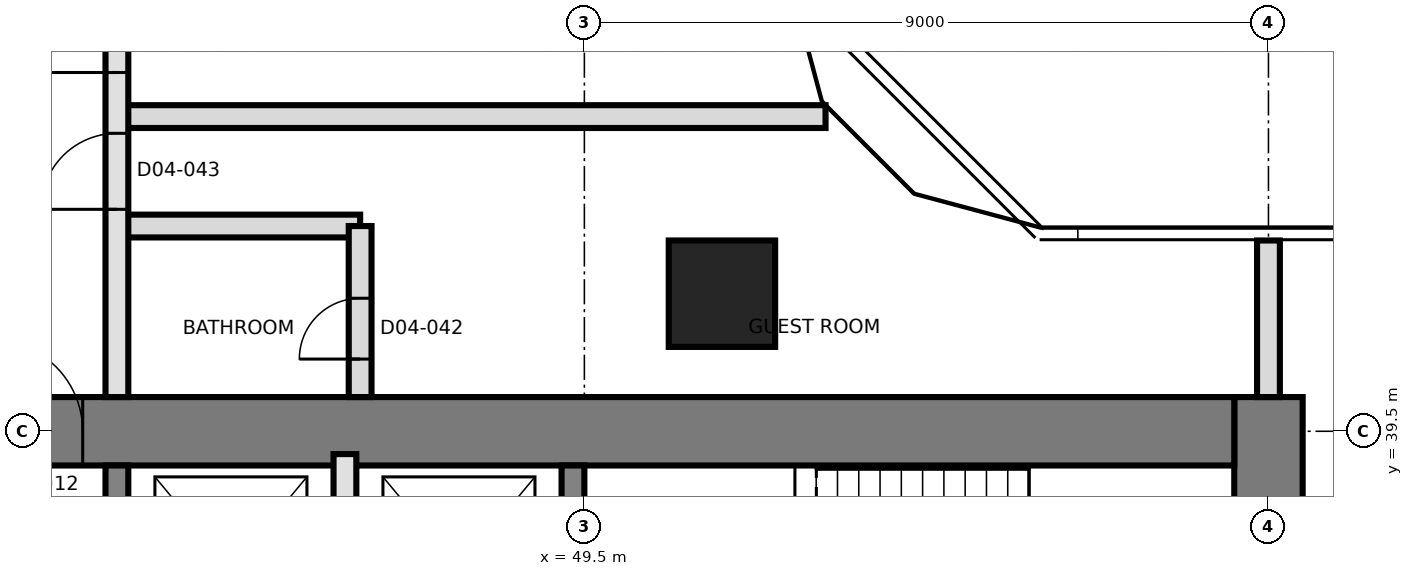
"""IFC4 building model, lengths in metres.
Left out: names, types, materials, properties, quantities, classifications, styles, units other than length and angle.
Written with IfcOpenShell. Run it as: python <this file> out.ifc"""

import sys

from ifc_helpers import new_model, si_unit, direction, frame, frame_2d, origin, origin_2d, place, context, subcontext, project, spatial, rectangle, extrude, element, fill, save


model = new_model("IFC4")
c1 = context("Model", 3, precision=1e-05, world=origin(), true_north=direction((0.0, 1.0)))
c2 = subcontext(c1, "Body", "Model", "MODEL_VIEW")
j1 = project(units=[si_unit("LENGTHUNIT", "METRE"), si_unit("PLANEANGLEUNIT", "RADIAN")], contexts=[c1])
p1 = place(None, origin())
s1 = spatial("IfcSite", under=j1, at=p1, CompositionType="ELEMENT")
p2 = place(p1, origin())
s2 = spatial("IfcBuilding", under=s1, at=p2, CompositionType="ELEMENT")
p3 = place(p2, frame((0.0, 0.0, 66.8)))
s3 = spatial("IfcBuildingStorey", under=s2, at=p3, CompositionType="ELEMENT", Elevation=66.8)
p4 = place(p3, frame((58.5, 21.05, 0.0), z_axis=(0.0, 0.0, 1.0), x_axis=(0.0, 1.0, 0.0)))
e1 = element("IfcWall", 1, at=p4, inside=s3, PredefinedType="SHEAR", context=c2, shape_type="SweptSolid", body=[
    extrude(rectangle(XDim=18.9, YDim=0.9, at=frame_2d((9.45, 0.0))), origin(), (0.0, 0.0, 1.0), 3.7),
])
p5 = place(p4, frame((10.35, 0.0, 0.0)))
e2 = element("IfcOpeningElement", 2, at=p5, cuts=e1, PredefinedType="OPENING", context=c2, shape_type="SweptSolid", body=[
    extrude(rectangle(XDim=1.2, YDim=2.1, at=frame_2d((0.6, 1.05))), frame((0.0, 0.46, 0.0), z_axis=(0.0, -1.0, 0.0), x_axis=(1.0, 0.0, 0.0)), (0.0, 0.0, 1.0), 0.92),
])
p6 = place(p3, frame((31.05, 39.5, 0.0), z_axis=(0.0, 0.0, 1.0), x_axis=(1.0, 0.0, 0.0)))
e3 = element("IfcWall", 3, at=p6, inside=s3, PredefinedType="SHEAR", context=c2, shape_type="SweptSolid", body=[
    extrude(rectangle(XDim=27.0, YDim=0.9, at=frame_2d((13.5, 0.0))), origin(), (0.0, 0.0, 1.0), 3.7),
])
p7 = place(p6, frame((10.65, 0.0, 0.0)))
e4 = element("IfcOpeningElement", 4, at=p7, cuts=e3, PredefinedType="OPENING", context=c2, shape_type="SweptSolid", body=[
    extrude(rectangle(XDim=1.2, YDim=2.1, at=frame_2d((0.6, 1.05))), frame((0.0, 0.46, 0.0), z_axis=(0.0, -1.0, 0.0), x_axis=(1.0, 0.0, 0.0)), (0.0, 0.0, 1.0), 0.92),
])
for number, where, z_axis, x_axis in (
    (5, (43.35, 33.5, 0.0), (0.0, 0.0, 1.0), (0.0, 1.0, 0.0)),
    (6, (49.35, 33.5, 0.0), (0.0, 0.0, 1.0), (0.0, 1.0, 0.0)),
):
    element("IfcWall", number, at=place(p3, frame(where, z_axis=z_axis, x_axis=x_axis)), inside=s3, PredefinedType="SHEAR", context=c2, shape_type="SweptSolid", body=[
        extrude(rectangle(XDim=5.55, YDim=0.3, at=frame_2d((2.775, 0.0))), origin(), (0.0, 0.0, 1.0), 3.7),
    ])
p8 = place(p3, frame((51.31, 41.31, 0.0), z_axis=(0.0, 0.0, 1.0), x_axis=(1.0, 0.0, 0.0)))
e7 = element("IfcColumn", 7, at=p8, inside=s3, PredefinedType="COLUMN", context=c2, shape_type="SweptSolid", body=[
    extrude(rectangle(XDim=1.4, YDim=1.4, at=origin_2d()), origin(), (0.0, 0.0, 1.0), 3.7),
])
p9 = place(p3, frame((46.35, 36.2, 0.0), z_axis=(0.0, 0.0, 1.0), x_axis=(0.0, 1.0, 0.0)))
e8 = element("IfcWall", 8, at=p9, inside=s3, PredefinedType="SOLIDWALL", context=c2, shape_type="SweptSolid", body=[
    extrude(rectangle(XDim=3.0, YDim=0.3, at=frame_2d((1.5, 0.0))), origin(), (0.0, 0.0, 1.0), 3.4),
])
p10 = place(p3, frame((43.35, 42.2, 0.0), z_axis=(0.0, 0.0, 1.0), x_axis=(1.0, 0.0, 0.0)))
e9 = element("IfcWall", 9, at=p10, inside=s3, PredefinedType="PARTITIONING", context=c2, shape_type="SweptSolid", body=[
    extrude(rectangle(XDim=3.2, YDim=0.3, at=frame_2d((1.6, 0.0))), origin(), (0.0, 0.0, 1.0), 3.4),
])
p11 = place(p3, frame((43.35, 43.64, 0.0), z_axis=(0.0, 0.0, 1.0), x_axis=(1.0, 0.0, 0.0)))
e10 = element("IfcWall", 10, at=p11, inside=s3, PredefinedType="PARTITIONING", context=c2, shape_type="SweptSolid", body=[
    extrude(rectangle(XDim=9.323, YDim=0.3, at=frame_2d((4.662, 0.0))), origin(), (0.0, 0.0, 1.0), 3.35),
])
p12 = place(p3, frame((43.35, 39.95, 0.0), z_axis=(0.0, 0.0, 1.0), x_axis=(0.0, 1.0, 0.0)))
e11 = element("IfcWall", 11, at=p12, inside=s3, PredefinedType="SOLIDWALL", context=c2, shape_type="SweptSolid", body=[
    extrude(rectangle(XDim=25.8, YDim=0.3, at=frame_2d((12.9, 0.0))), origin(), (0.0, 0.0, 1.0), 3.4),
])
p13 = place(p12, frame((2.47, 0.0, 0.0)))
e12 = element("IfcOpeningElement", 12, at=p13, cuts=e11, PredefinedType="OPENING", context=c2, shape_type="SweptSolid", body=[
    extrude(rectangle(XDim=1.0, YDim=2.1, at=frame_2d((0.5, 1.05))), frame((0.0, 0.16, 0.0), z_axis=(0.0, -1.0, 0.0), x_axis=(1.0, 0.0, 0.0)), (0.0, 0.0, 1.0), 0.32),
])
p14 = place(p12, frame((4.27, 0.0, 0.0)))
e13 = element("IfcOpeningElement", 13, at=p14, cuts=e11, PredefinedType="OPENING", context=c2, shape_type="SweptSolid", body=[
    extrude(rectangle(XDim=1.0, YDim=2.1, at=frame_2d((0.5, 1.05))), frame((0.0, 0.16, 0.0), z_axis=(0.0, -1.0, 0.0), x_axis=(1.0, 0.0, 0.0)), (0.0, 0.0, 1.0), 0.32),
])
p15 = place(p12, frame((12.55, 0.0, 0.0)))
e14 = element("IfcOpeningElement", 14, at=p15, cuts=e11, PredefinedType="OPENING", context=c2, shape_type="SweptSolid", body=[
    extrude(rectangle(XDim=1.0, YDim=2.4, at=frame_2d((0.5, 1.2))), frame((0.0, 0.16, 0.0), z_axis=(0.0, -1.0, 0.0), x_axis=(1.0, 0.0, 0.0)), (0.0, 0.0, 1.0), 0.32),
])
p16 = place(p12, frame((19.55, 0.0, 0.0)))
e15 = element("IfcOpeningElement", 15, at=p16, cuts=e11, PredefinedType="OPENING", context=c2, shape_type="SweptSolid", body=[
    extrude(rectangle(XDim=1.0, YDim=2.4, at=frame_2d((0.5, 1.2))), frame((0.0, 0.16, 0.0), z_axis=(0.0, -1.0, 0.0), x_axis=(1.0, 0.0, 0.0)), (0.0, 0.0, 1.0), 0.32),
])
p17 = place(p3, frame((46.55, 39.95, 0.0), z_axis=(0.0, 0.0, 1.0), x_axis=(0.0, 1.0, 0.0)))
e16 = element("IfcWall", 16, at=p17, inside=s3, PredefinedType="PARTITIONING", context=c2, shape_type="SweptSolid", body=[
    extrude(rectangle(XDim=2.25, YDim=0.3, at=frame_2d((1.125, 0.0))), origin(), (0.0, 0.0, 1.0), 3.4),
])
p18 = place(p17, frame((0.5, 0.0, 0.0)))
e17 = element("IfcOpeningElement", 17, at=p18, cuts=e16, PredefinedType="OPENING", context=c2, shape_type="SweptSolid", body=[
    extrude(rectangle(XDim=0.8, YDim=2.1, at=frame_2d((0.4, 1.05))), frame((0.0, 0.16, 0.0), z_axis=(0.0, -1.0, 0.0), x_axis=(1.0, 0.0, 0.0)), (0.0, 0.0, 1.0), 0.32),
])
p19 = place(p3, frame((58.5, 39.95, 0.0), z_axis=(0.0, 0.0, 1.0), x_axis=(0.0, 1.0, 0.0)))
e18 = element("IfcWall", 18, at=p19, inside=s3, PredefinedType="PARTITIONING", context=c2, shape_type="SweptSolid", body=[
    extrude(rectangle(XDim=2.06, YDim=0.3, at=frame_2d((1.03, 0.0))), origin(), (0.0, 0.0, 1.0), 3.35),
])
p20 = place(p7, origin())
e19 = element("IfcDoor", 19, at=p20, inside=s3, OperationType="SINGLE_SWING_RIGHT", PredefinedType="DOOR", context=c2, shape_type="SweptSolid", body=[
    extrude(rectangle(XDim=1.2, YDim=2.1, at=frame_2d((0.6, 1.05))), frame((0.0, 0.025, 0.0), z_axis=(0.0, -1.0, 0.0), x_axis=(1.0, 0.0, 0.0)), (0.0, 0.0, 1.0), 0.05),
])
fill(e4, e19)
p21 = place(p18, origin())
e20 = element("IfcDoor", 20, at=p21, inside=s3, OperationType="SINGLE_SWING_RIGHT", PredefinedType="DOOR", context=c2, shape_type="SweptSolid", body=[
    extrude(rectangle(XDim=0.8, YDim=2.1, at=frame_2d((0.4, 1.05))), frame((0.0, 0.025, 0.0), z_axis=(0.0, -1.0, 0.0), x_axis=(1.0, 0.0, 0.0)), (0.0, 0.0, 1.0), 0.05),
])
fill(e17, e20)
p22 = place(p13, origin())
e21 = element("IfcDoor", 21, at=p22, inside=s3, OperationType="SINGLE_SWING_LEFT", PredefinedType="DOOR", context=c2, shape_type="SweptSolid", body=[
    extrude(rectangle(XDim=1.0, YDim=2.1, at=frame_2d((0.5, 1.05))), frame((0.0, 0.025, 0.0), z_axis=(0.0, -1.0, 0.0), x_axis=(1.0, 0.0, 0.0)), (0.0, 0.0, 1.0), 0.05),
])
fill(e12, e21)
p23 = place(p14, origin())
e22 = element("IfcDoor", 22, at=p23, inside=s3, OperationType="SINGLE_SWING_LEFT", PredefinedType="DOOR", context=c2, shape_type="SweptSolid", body=[
    extrude(rectangle(XDim=1.0, YDim=2.1, at=frame_2d((0.5, 1.05))), frame((0.0, 0.025, 0.0), z_axis=(0.0, -1.0, 0.0), x_axis=(1.0, 0.0, 0.0)), (0.0, 0.0, 1.0), 0.05),
])
fill(e13, e22)
save(model, sys.argv[1])
